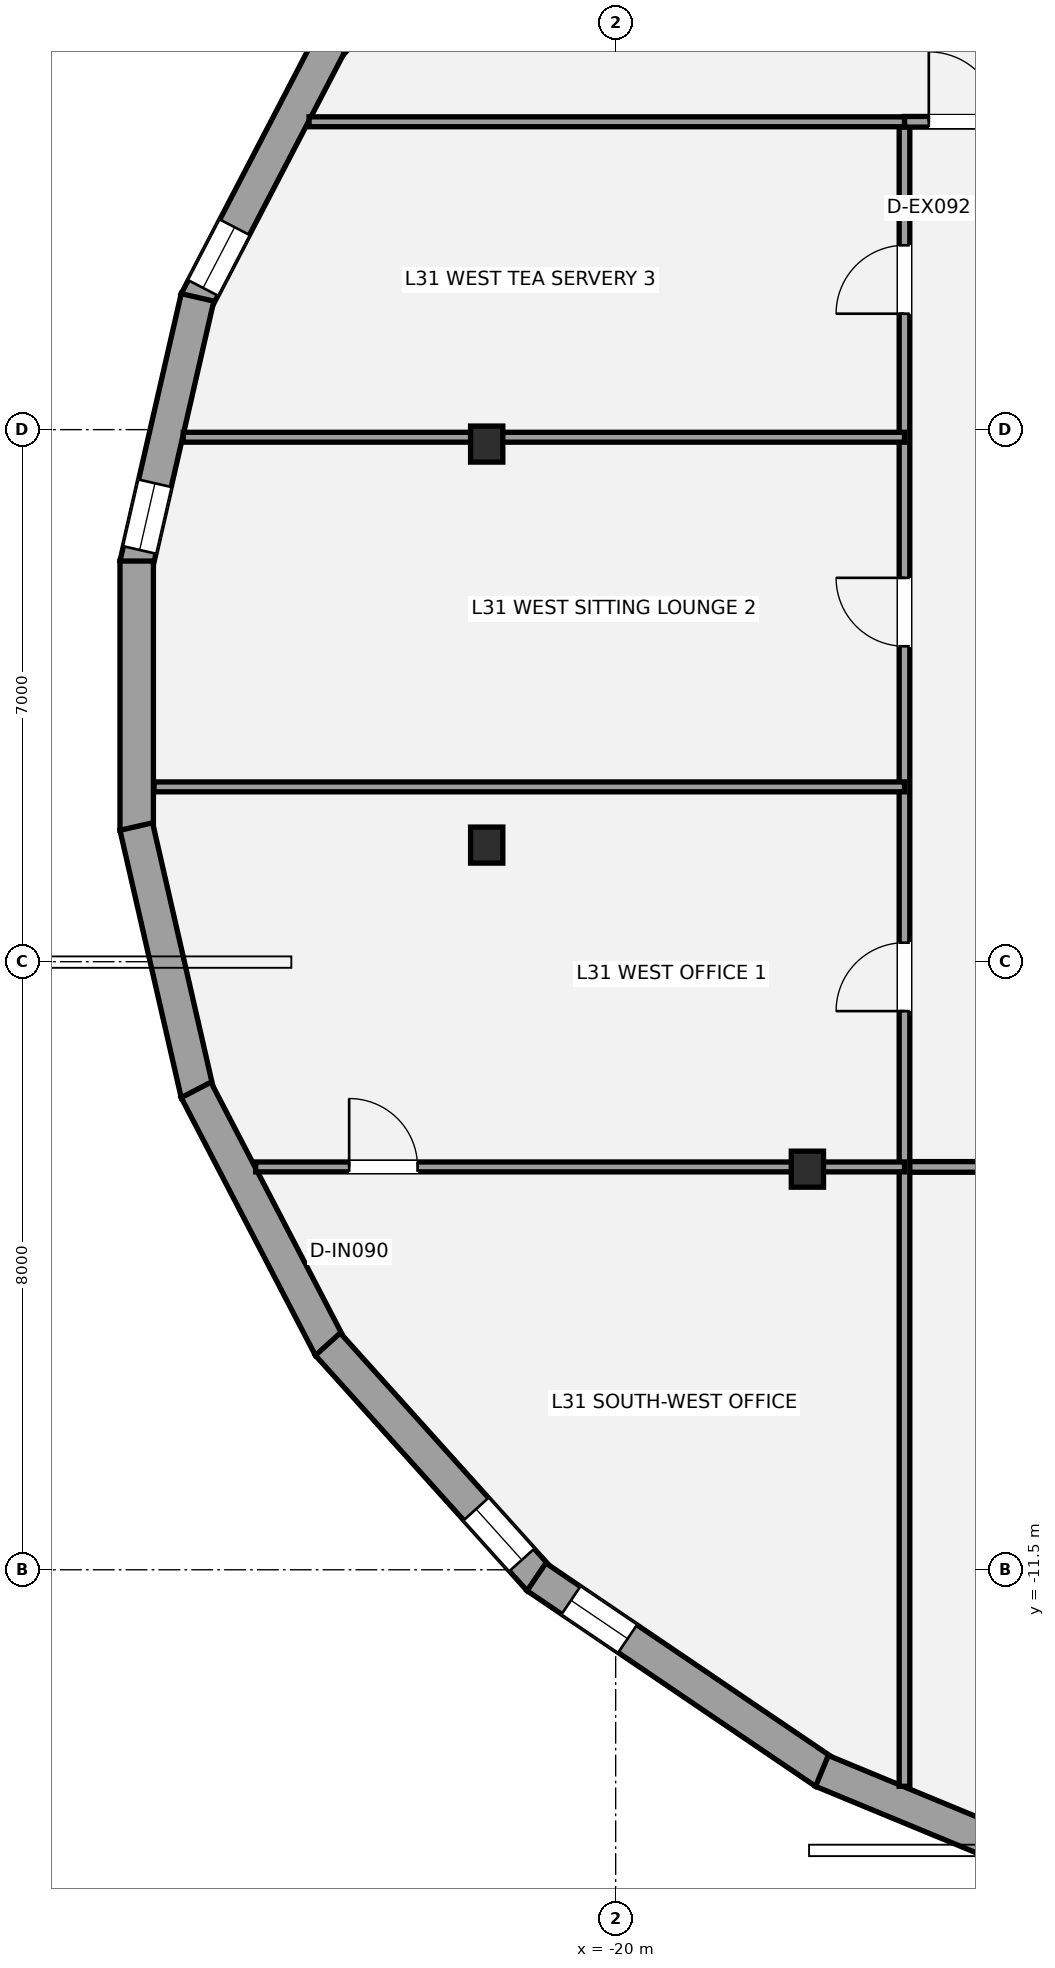
"""IFC4 building model, lengths in metres.
Left out: names, types, materials, properties, quantities, classifications, styles, units other than length and angle.
Written with IfcOpenShell. Run it as: python <this file> out.ifc"""

import sys

from ifc_helpers import new_model, si_unit, direction, frame, frame_2d, origin, origin_2d, place, context, subcontext, project, spatial, rectangle, i_section, extrude, element, fill, save


model = new_model("IFC4")
c1 = context("Model", 3, precision=1e-05, world=origin(), true_north=direction((0.0, 1.0)))
c2 = subcontext(c1, "Body", "Model", "MODEL_VIEW")
j1 = project(units=[si_unit("LENGTHUNIT", "METRE"), si_unit("PLANEANGLEUNIT", "RADIAN")], contexts=[c1])
p1 = place(None, origin())
s1 = spatial("IfcSite", under=j1, at=p1, CompositionType="ELEMENT")
p2 = place(p1, origin())
s2 = spatial("IfcBuilding", under=s1, at=p2, CompositionType="ELEMENT")
p3 = place(p2, frame((0.0, 0.0, 117.6)))
s3 = spatial("IfcBuildingStorey", under=s2, at=p3, CompositionType="ELEMENT", Elevation=117.6)
for number, where, z_axis, x_axis in (
    (1, (-21.697, 3.31, 0.0), (0.0, 0.0, 1.0), (1.0, 0.0, 0.0)),
    (2, (-21.697, -1.966, 0.0), (0.0, 0.0, 1.0), (1.0, 0.0, 0.0)),
    (3, (-17.477, -6.229, 0.0), (0.0, 0.0, 1.0), (1.0, 0.0, 0.0)),
):
    element("IfcColumn", number, at=place(p3, frame(where, z_axis=z_axis, x_axis=x_axis)), inside=s3, PredefinedType="COLUMN", context=c2, shape_type="SweptSolid", body=[
        extrude(i_section(OverallWidth=0.424, OverallDepth=0.474, WebThickness=0.048, FlangeThickness=0.077, at=origin_2d()), origin(), (0.0, 0.0, 1.0), 3.5),
    ])
p4 = place(p3, frame((-23.787, 8.532, 0.0), z_axis=(0.0, 0.0, 1.0), x_axis=(0.668754222456, 0.743483550556, 0.0)))
e4 = element("IfcWall", 4, at=p4, inside=s3, PredefinedType="STANDARD", context=c2, shape_type="SweptSolid", body=[
    extrude(rectangle(XDim=4.166, YDim=0.44, at=frame_2d((2.083, 0.0))), origin(), (0.0, 0.0, 1.0), 2.528),
])
p5 = place(p4, frame((0.398, 0.0, 0.58)))
e5 = element("IfcOpeningElement", 5, at=p5, cuts=e4, PredefinedType="OPENING", context=c2, shape_type="SweptSolid", body=[
    extrude(rectangle(XDim=0.9, YDim=1.35, at=frame_2d((0.45, 0.675))), frame((0.0, 0.23, 0.0), z_axis=(0.0, -1.0, 0.0), x_axis=(1.0, 0.0, 0.0)), (0.0, 0.0, 1.0), 0.46),
])
p6 = place(p3, frame((-25.521, 5.187, 0.0), z_axis=(0.0, 0.0, 1.0), x_axis=(0.461766944701, 0.88700129018, 0.0)))
e6 = element("IfcWall", 6, at=p6, inside=s3, PredefinedType="STANDARD", context=c2, shape_type="SweptSolid", body=[
    extrude(rectangle(XDim=3.823, YDim=0.44, at=frame_2d((1.911, 0.0))), origin(), (0.0, 0.0, 1.0), 2.528),
])
p7 = place(p6, frame((0.2, 0.0, 0.92)))
e7 = element("IfcOpeningElement", 7, at=p7, cuts=e6, PredefinedType="OPENING", context=c2, shape_type="SweptSolid", body=[
    extrude(rectangle(XDim=0.9, YDim=1.35, at=frame_2d((0.45, 0.675))), frame((0.0, 0.23, 0.0), z_axis=(0.0, -1.0, 0.0), x_axis=(1.0, 0.0, 0.0)), (0.0, 0.0, 1.0), 0.46),
])
p8 = place(p3, frame((-26.308, 1.722, 0.0), z_axis=(0.0, 0.0, 1.0), x_axis=(0.223322591546, 0.974744592242, 0.0)))
e8 = element("IfcWall", 8, at=p8, inside=s3, PredefinedType="STANDARD", context=c2, shape_type="SweptSolid", body=[
    extrude(rectangle(XDim=3.609, YDim=0.44, at=frame_2d((1.804, 0.0))), origin(), (0.0, 0.0, 1.0), 2.528),
])
p9 = place(p8, frame((0.2, 0.0, 0.42)))
e9 = element("IfcOpeningElement", 9, at=p9, cuts=e8, PredefinedType="OPENING", context=c2, shape_type="SweptSolid", body=[
    extrude(rectangle(XDim=0.9, YDim=1.35, at=frame_2d((0.45, 0.675))), frame((0.0, 0.23, 0.0), z_axis=(0.0, -1.0, 0.0), x_axis=(1.0, 0.0, 0.0)), (0.0, 0.0, 1.0), 0.46),
])
p10 = place(p3, frame((-26.302, -1.771, 0.0), z_axis=(0.0, 0.0, 1.0), x_axis=(0.0, 1.0, 0.0)))
e10 = element("IfcWall", 10, at=p10, inside=s3, PredefinedType="STANDARD", context=c2, shape_type="SweptSolid", body=[
    extrude(rectangle(XDim=3.542, YDim=0.44, at=frame_2d((1.771, 0.0))), origin(), (0.0, 0.0, 1.0), 2.528),
])
p11 = place(p3, frame((-25.502, -5.24, 0.0), z_axis=(0.0, 0.0, 1.0), x_axis=(-0.223322591546, 0.974744592242, 0.0)))
e11 = element("IfcWall", 11, at=p11, inside=s3, PredefinedType="STANDARD", context=c2, shape_type="SweptSolid", body=[
    extrude(rectangle(XDim=3.609, YDim=0.44, at=frame_2d((1.804, 0.0))), origin(), (0.0, 0.0, 1.0), 2.528),
])
p12 = place(p3, frame((-23.756, -8.578, 0.0), z_axis=(0.0, 0.0, 1.0), x_axis=(-0.461766944701, 0.88700129018, 0.0)))
e12 = element("IfcWall", 12, at=p12, inside=s3, PredefinedType="STANDARD", context=c2, shape_type="SweptSolid", body=[
    extrude(rectangle(XDim=3.823, YDim=0.44, at=frame_2d((1.911, 0.0))), origin(), (0.0, 0.0, 1.0), 2.528),
])
p13 = place(p3, frame((-21.002, -11.629, 0.0), z_axis=(0.0, 0.0, 1.0), x_axis=(-0.668754222456, 0.743483550556, 0.0)))
e13 = element("IfcWall", 13, at=p13, inside=s3, PredefinedType="STANDARD", context=c2, shape_type="SweptSolid", body=[
    extrude(rectangle(XDim=4.166, YDim=0.44, at=frame_2d((2.083, 0.0))), origin(), (0.0, 0.0, 1.0), 2.528),
])
p14 = place(p13, frame((0.348, 0.0, 0.58)))
e14 = element("IfcOpeningElement", 14, at=p14, cuts=e13, PredefinedType="OPENING", context=c2, shape_type="SweptSolid", body=[
    extrude(rectangle(XDim=0.9, YDim=1.35, at=frame_2d((0.45, 0.675))), frame((0.0, 0.23, 0.0), z_axis=(0.0, -1.0, 0.0), x_axis=(1.0, 0.0, 0.0)), (0.0, 0.0, 1.0), 0.46),
])
p15 = place(p3, frame((-17.247, -14.167, 0.0), z_axis=(0.0, 0.0, 1.0), x_axis=(-0.827700115196, 0.561170668607, 0.0)))
e15 = element("IfcWall", 15, at=p15, inside=s3, PredefinedType="STANDARD", context=c2, shape_type="SweptSolid", body=[
    extrude(rectangle(XDim=4.585, YDim=0.44, at=frame_2d((2.293, 0.0))), origin(), (0.0, 0.0, 1.0), 2.528),
])
p16 = place(p15, frame((3.137, 0.0, 0.58)))
e16 = element("IfcOpeningElement", 16, at=p16, cuts=e15, PredefinedType="OPENING", context=c2, shape_type="SweptSolid", body=[
    extrude(rectangle(XDim=0.9, YDim=1.35, at=frame_2d((0.45, 0.675))), frame((0.0, 0.23, 0.0), z_axis=(0.0, -1.0, 0.0), x_axis=(1.0, 0.0, 0.0)), (0.0, 0.0, 1.0), 0.46),
])
p17 = place(p3, frame((-12.718, -16.034, 0.0), z_axis=(0.0, 0.0, 1.0), x_axis=(-0.924140141084, 0.382053660678, 0.0)))
e17 = element("IfcWall", 17, at=p17, inside=s3, PredefinedType="STANDARD", context=c2, shape_type="SweptSolid", body=[
    extrude(rectangle(XDim=4.943, YDim=0.44, at=frame_2d((2.471, 0.0))), origin(), (0.0, 0.0, 1.0), 2.528),
])
p18 = place(p17, frame((0.649, 0.0, 0.58)))
e18 = element("IfcOpeningElement", 18, at=p18, cuts=e17, PredefinedType="OPENING", context=c2, shape_type="SweptSolid", body=[
    extrude(rectangle(XDim=0.9, YDim=1.35, at=frame_2d((0.45, 0.675))), frame((0.0, 0.23, 0.0), z_axis=(0.0, -1.0, 0.0), x_axis=(1.0, 0.0, 0.0)), (0.0, 0.0, 1.0), 0.46),
])
p19 = place(p3, frame((-16.2, -6.2, 0.0), z_axis=(0.0, 0.0, 1.0), x_axis=(1.0, 0.0, 0.0)))
e19 = element("IfcWall", 19, at=p19, inside=s3, PredefinedType="PARTITIONING", context=c2, shape_type="SweptSolid", body=[
    extrude(rectangle(XDim=34.0, YDim=0.14, at=frame_2d((17.0, 0.0))), origin(), (0.0, 0.0, 1.0), 2.688),
])
p20 = place(p19, frame((2.75, 0.0, 0.0)))
e20 = element("IfcOpeningElement", 20, at=p20, cuts=e19, PredefinedType="OPENING", context=c2, shape_type="SweptSolid", body=[
    extrude(rectangle(XDim=0.9, YDim=2.1, at=frame_2d((0.45, 1.05))), frame((0.0, 0.08, 0.0), z_axis=(0.0, -1.0, 0.0), x_axis=(1.0, 0.0, 0.0)), (0.0, 0.0, 1.0), 0.16),
])
p21 = place(p19, frame((9.45, 0.0, 0.0)))
e21 = element("IfcOpeningElement", 21, at=p21, cuts=e19, PredefinedType="OPENING", context=c2, shape_type="SweptSolid", body=[
    extrude(rectangle(XDim=0.9, YDim=2.1, at=frame_2d((0.45, 1.05))), frame((0.0, 0.08, 0.0), z_axis=(0.0, -1.0, 0.0), x_axis=(1.0, 0.0, 0.0)), (0.0, 0.0, 1.0), 0.16),
])
p22 = place(p19, frame((16.45, 0.0, 0.0)))
e22 = element("IfcOpeningElement", 22, at=p22, cuts=e19, PredefinedType="OPENING", context=c2, shape_type="SweptSolid", body=[
    extrude(rectangle(XDim=0.9, YDim=2.1, at=frame_2d((0.45, 1.05))), frame((0.0, 0.08, 0.0), z_axis=(0.0, -1.0, 0.0), x_axis=(1.0, 0.0, 0.0)), (0.0, 0.0, 1.0), 0.16),
])
p23 = place(p19, frame((22.95, 0.0, 0.0)))
e23 = element("IfcOpeningElement", 23, at=p23, cuts=e19, PredefinedType="OPENING", context=c2, shape_type="SweptSolid", body=[
    extrude(rectangle(XDim=0.9, YDim=2.1, at=frame_2d((0.45, 1.05))), frame((0.0, 0.08, 0.0), z_axis=(0.0, -1.0, 0.0), x_axis=(1.0, 0.0, 0.0)), (0.0, 0.0, 1.0), 0.16),
])
p24 = place(p19, frame((29.45, 0.0, 0.0)))
e24 = element("IfcOpeningElement", 24, at=p24, cuts=e19, PredefinedType="OPENING", context=c2, shape_type="SweptSolid", body=[
    extrude(rectangle(XDim=1.5, YDim=2.15, at=frame_2d((0.75, 1.075))), frame((0.0, 0.08, 0.0), z_axis=(0.0, -1.0, 0.0), x_axis=(1.0, 0.0, 0.0)), (0.0, 0.0, 1.0), 0.16),
])
p25 = place(p3, frame((-16.2, -14.348, 0.0), z_axis=(0.0, 0.0, 1.0), x_axis=(0.0, 1.0, 0.0)))
e25 = element("IfcWall", 25, at=p25, inside=s3, PredefinedType="PARTITIONING", context=c2, shape_type="SweptSolid", body=[
    extrude(rectangle(XDim=21.898, YDim=0.14, at=frame_2d((10.949, 0.0))), origin(), (0.0, 0.0, 1.0), 2.763),
])
p26 = place(p25, frame((10.198, 0.0, 0.0)))
e26 = element("IfcOpeningElement", 26, at=p26, cuts=e25, PredefinedType="OPENING", context=c2, shape_type="SweptSolid", body=[
    extrude(rectangle(XDim=0.9, YDim=2.1, at=frame_2d((0.45, 1.05))), frame((0.0, 0.08, 0.0), z_axis=(0.0, -1.0, 0.0), x_axis=(1.0, 0.0, 0.0)), (0.0, 0.0, 1.0), 0.16),
])
p27 = place(p25, frame((14.998, 0.0, 0.0)))
e27 = element("IfcOpeningElement", 27, at=p27, cuts=e25, PredefinedType="OPENING", context=c2, shape_type="SweptSolid", body=[
    extrude(rectangle(XDim=0.9, YDim=2.1, at=frame_2d((0.45, 1.05))), frame((0.0, 0.08, 0.0), z_axis=(0.0, -1.0, 0.0), x_axis=(1.0, 0.0, 0.0)), (0.0, 0.0, 1.0), 0.16),
])
p28 = place(p25, frame((19.373, 0.0, 0.0)))
e28 = element("IfcOpeningElement", 28, at=p28, cuts=e25, PredefinedType="OPENING", context=c2, shape_type="SweptSolid", body=[
    extrude(rectangle(XDim=0.9, YDim=2.1, at=frame_2d((0.45, 1.05))), frame((0.0, 0.08, 0.0), z_axis=(0.0, -1.0, 0.0), x_axis=(1.0, 0.0, 0.0)), (0.0, 0.0, 1.0), 0.16),
])
p29 = place(p3, frame((-16.2, 7.55, 0.0), z_axis=(0.0, 0.0, 1.0), x_axis=(1.0, 0.0, 0.0)))
e29 = element("IfcWall", 29, at=p29, inside=s3, PredefinedType="PARTITIONING", context=c2, shape_type="SweptSolid", body=[
    extrude(rectangle(XDim=2.3, YDim=0.14, at=frame_2d((1.15, 0.0))), origin(), (0.0, 0.0, 1.0), 2.763),
])
p30 = place(p29, frame((0.32, 0.0, 0.0)))
e30 = element("IfcOpeningElement", 30, at=p30, cuts=e29, PredefinedType="OPENING", context=c2, shape_type="SweptSolid", body=[
    extrude(rectangle(XDim=0.92, YDim=2.15, at=frame_2d((0.46, 1.075))), frame((0.0, 0.08, 0.0), z_axis=(0.0, -1.0, 0.0), x_axis=(1.0, 0.0, 0.0)), (0.0, 0.0, 1.0), 0.16),
])
p31 = place(p3, frame((-24.034, 7.55, 0.0), z_axis=(0.0, 0.0, 1.0), x_axis=(1.0, 0.0, 0.0)))
e31 = element("IfcWall", 31, at=p31, inside=s3, PredefinedType="PARTITIONING", context=c2, shape_type="SweptSolid", body=[
    extrude(rectangle(XDim=7.834, YDim=0.13, at=frame_2d((3.917, 0.0))), origin(), (0.0, 0.0, 1.0), 3.31),
])
p32 = place(p3, frame((-24.737, -6.2, 0.0), z_axis=(0.0, 0.0, 1.0), x_axis=(1.0, 0.0, 0.0)))
e32 = element("IfcWall", 32, at=p32, inside=s3, PredefinedType="PARTITIONING", context=c2, shape_type="SweptSolid", body=[
    extrude(rectangle(XDim=8.537, YDim=0.13, at=frame_2d((4.268, 0.0))), origin(), (0.0, 0.0, 1.0), 2.688),
])
p33 = place(p32, frame((1.23, 0.0, 0.0)))
e33 = element("IfcOpeningElement", 33, at=p33, cuts=e32, PredefinedType="OPENING", context=c2, shape_type="SweptSolid", body=[
    extrude(rectangle(XDim=0.9, YDim=2.1, at=frame_2d((0.45, 1.05))), frame((0.0, 0.075, 0.0), z_axis=(0.0, -1.0, 0.0), x_axis=(1.0, 0.0, 0.0)), (0.0, 0.0, 1.0), 0.15),
])
p34 = place(p3, frame((-26.074, -1.2, 0.0), z_axis=(0.0, 0.0, 1.0), x_axis=(1.0, 0.0, 0.0)))
e34 = element("IfcWall", 34, at=p34, inside=s3, PredefinedType="PARTITIONING", context=c2, shape_type="SweptSolid", body=[
    extrude(rectangle(XDim=9.874, YDim=0.13, at=frame_2d((4.937, 0.0))), origin(), (0.0, 0.0, 1.0), 2.763),
])
p35 = place(p3, frame((-25.689, 3.4, 0.0), z_axis=(0.0, 0.0, 1.0), x_axis=(1.0, 0.0, 0.0)))
e35 = element("IfcWall", 35, at=p35, inside=s3, PredefinedType="PARTITIONING", context=c2, shape_type="SweptSolid", body=[
    extrude(rectangle(XDim=9.489, YDim=0.13, at=frame_2d((4.745, 0.0))), origin(), (0.0, 0.0, 1.0), 2.763),
])
p36 = place(p7, origin())
e36 = element("IfcWindow", 36, at=p36, inside=s3, PartitioningType="SINGLE_PANEL", PredefinedType="WINDOW", context=c2, shape_type="SweptSolid", body=[
    extrude(rectangle(XDim=0.9, YDim=1.35, at=frame_2d((0.45, 0.675))), frame((0.0, -0.01, 0.0), z_axis=(0.0, -1.0, 0.0), x_axis=(1.0, 0.0, 0.0)), (0.0, 0.0, 1.0), 0.06),
])
fill(e7, e36)
p37 = place(p9, origin())
e37 = element("IfcWindow", 37, at=p37, inside=s3, PartitioningType="SINGLE_PANEL", PredefinedType="WINDOW", context=c2, shape_type="SweptSolid", body=[
    extrude(rectangle(XDim=0.9, YDim=1.35, at=frame_2d((0.45, 0.675))), frame((0.0, -0.01, 0.0), z_axis=(0.0, -1.0, 0.0), x_axis=(1.0, 0.0, 0.0)), (0.0, 0.0, 1.0), 0.06),
])
fill(e9, e37)
p38 = place(p14, origin())
e38 = element("IfcWindow", 38, at=p38, inside=s3, PartitioningType="SINGLE_PANEL", PredefinedType="WINDOW", context=c2, shape_type="SweptSolid", body=[
    extrude(rectangle(XDim=0.9, YDim=1.35, at=frame_2d((0.45, 0.675))), frame((0.0, -0.01, 0.0), z_axis=(0.0, -1.0, 0.0), x_axis=(1.0, 0.0, 0.0)), (0.0, 0.0, 1.0), 0.06),
])
fill(e14, e38)
p39 = place(p16, origin())
e39 = element("IfcWindow", 39, at=p39, inside=s3, PartitioningType="SINGLE_PANEL", PredefinedType="WINDOW", context=c2, shape_type="SweptSolid", body=[
    extrude(rectangle(XDim=0.9, YDim=1.35, at=frame_2d((0.45, 0.675))), frame((0.0, -0.01, 0.0), z_axis=(0.0, -1.0, 0.0), x_axis=(1.0, 0.0, 0.0)), (0.0, 0.0, 1.0), 0.06),
])
fill(e16, e39)
p40 = place(p30, origin())
e40 = element("IfcDoor", 40, at=p40, inside=s3, OperationType="SINGLE_SWING_LEFT", PredefinedType="DOOR", context=c2, shape_type="SweptSolid", body=[
    extrude(rectangle(XDim=0.92, YDim=2.15, at=frame_2d((0.46, 1.075))), frame((0.0, 0.025, 0.0), z_axis=(0.0, -1.0, 0.0), x_axis=(1.0, 0.0, 0.0)), (0.0, 0.0, 1.0), 0.05),
])
fill(e30, e40)
p41 = place(p33, origin())
e41 = element("IfcDoor", 41, at=p41, inside=s3, OperationType="SINGLE_SWING_LEFT", PredefinedType="DOOR", context=c2, shape_type="SweptSolid", body=[
    extrude(rectangle(XDim=0.9, YDim=2.1, at=frame_2d((0.45, 1.05))), frame((0.0, 0.025, 0.0), z_axis=(0.0, -1.0, 0.0), x_axis=(1.0, 0.0, 0.0)), (0.0, 0.0, 1.0), 0.05),
])
fill(e33, e41)
p42 = place(p26, origin())
e42 = element("IfcDoor", 42, at=p42, inside=s3, OperationType="SINGLE_SWING_LEFT", PredefinedType="DOOR", context=c2, shape_type="SweptSolid", body=[
    extrude(rectangle(XDim=0.9, YDim=2.1, at=frame_2d((0.45, 1.05))), frame((0.0, 0.025, 0.0), z_axis=(0.0, -1.0, 0.0), x_axis=(1.0, 0.0, 0.0)), (0.0, 0.0, 1.0), 0.05),
])
fill(e26, e42)
p43 = place(p27, origin())
e43 = element("IfcDoor", 43, at=p43, inside=s3, OperationType="SINGLE_SWING_RIGHT", PredefinedType="DOOR", context=c2, shape_type="SweptSolid", body=[
    extrude(rectangle(XDim=0.9, YDim=2.1, at=frame_2d((0.45, 1.05))), frame((0.0, 0.025, 0.0), z_axis=(0.0, -1.0, 0.0), x_axis=(1.0, 0.0, 0.0)), (0.0, 0.0, 1.0), 0.05),
])
fill(e27, e43)
p44 = place(p28, origin())
e44 = element("IfcDoor", 44, at=p44, inside=s3, OperationType="SINGLE_SWING_LEFT", PredefinedType="DOOR", context=c2, shape_type="SweptSolid", body=[
    extrude(rectangle(XDim=0.9, YDim=2.1, at=frame_2d((0.45, 1.05))), frame((0.0, 0.025, 0.0), z_axis=(0.0, -1.0, 0.0), x_axis=(1.0, 0.0, 0.0)), (0.0, 0.0, 1.0), 0.05),
])
fill(e28, e44)
save(model, sys.argv[1])
